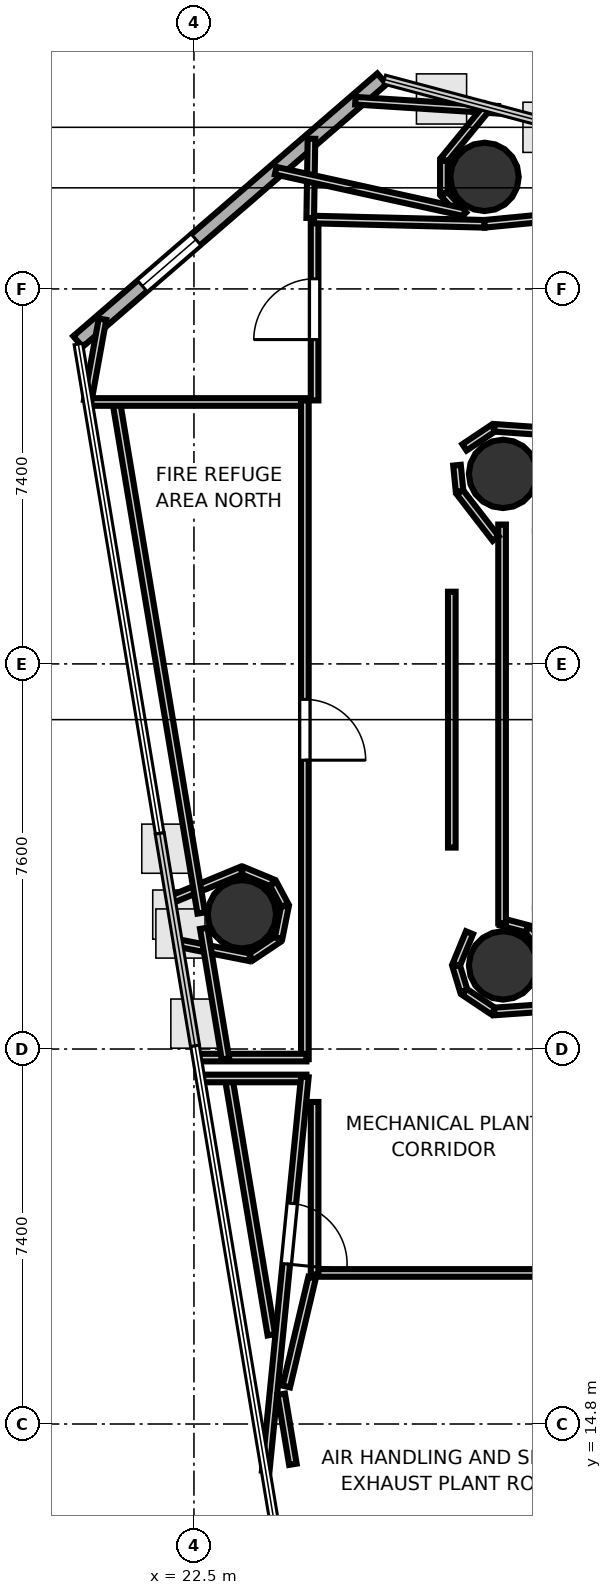
"""IFC4 building model, lengths in metres.
Left out: names, types, materials, properties, quantities, classifications, styles, units other than length and angle.
Written with IfcOpenShell. Run it as: python <this file> out.ifc"""

import sys

from ifc_helpers import new_model, si_unit, direction, frame, frame_2d, origin, origin_2d, place, context, subcontext, project, spatial, rectangle, hollow_circle, extrude, element, fill, save


model = new_model("IFC4")
c1 = context("Model", 3, precision=1e-05, world=origin(), true_north=direction((0.0, 1.0)))
c2 = subcontext(c1, "Body", "Model", "MODEL_VIEW")
j1 = project(units=[si_unit("LENGTHUNIT", "METRE"), si_unit("PLANEANGLEUNIT", "RADIAN")], contexts=[c1])
p1 = place(None, origin())
s1 = spatial("IfcSite", under=j1, at=p1, CompositionType="ELEMENT")
p2 = place(p1, origin())
s2 = spatial("IfcBuilding", under=s1, at=p2, CompositionType="ELEMENT")
p3 = place(p2, frame((0.0, 0.0, 184.6)))
s3 = spatial("IfcBuildingStorey", under=s2, at=p3, CompositionType="ELEMENT", Elevation=184.6)
for number, where, z_axis, x_axis in (
    (1, (28.6, 33.55, 0.0), (0.0, 0.0, 1.0), (1.0, 0.0, 0.0)),
    (2, (28.6, 23.85, 0.0), (0.0, 0.0, 1.0), (1.0, 0.0, 0.0)),
    (3, (28.235, 39.411, 0.0), (0.0, 0.0, 1.0), (1.0, 0.0, 0.0)),
    (4, (23.446, 24.859, 0.0), (0.0, 0.0, 1.0), (1.0, 0.0, 0.0)),
):
    element("IfcColumn", number, at=place(p3, frame(where, z_axis=z_axis, x_axis=x_axis)), inside=s3, PredefinedType="COLUMN", context=c2, shape_type="SweptSolid", body=[
        extrude(hollow_circle(Radius=0.675, WallThickness=0.032, at=origin_2d()), origin(), (0.0, 0.0, 1.0), 4.6),
    ])
p4 = place(p3, frame((26.21, 41.345, 0.0), z_axis=(0.0, 0.0, 1.0), x_axis=(-0.756696991228, -0.653765755808, 0.0)))
e5 = element("IfcWall", 5, at=p4, inside=s3, PredefinedType="SOLIDWALL", context=c2, shape_type="SweptSolid", body=[
    extrude(rectangle(XDim=7.929, YDim=0.28, at=frame_2d((3.965, 0.0))), origin(), (0.0, 0.0, 1.0), 4.42),
])
p5 = place(p4, frame((4.85, 0.0, 1.0)))
e6 = element("IfcOpeningElement", 6, at=p5, cuts=e5, PredefinedType="OPENING", context=c2, shape_type="SweptSolid", body=[
    extrude(rectangle(XDim=1.4, YDim=1.5, at=frame_2d((0.7, 0.75))), frame((0.0, 0.15, 0.0), z_axis=(0.0, -1.0, 0.0), x_axis=(1.0, 0.0, 0.0)), (0.0, 0.0, 1.0), 0.3),
])
p6 = place(p3, frame((29.402, 24.169, 0.0), z_axis=(0.0, 0.0, 1.0), x_axis=(-0.622091855036, 0.782944266151, 0.0)))
e7 = element("IfcWall", 7, at=p6, inside=s3, PredefinedType="PARTITIONING", context=c2, shape_type="SweptSolid", body=[
    extrude(rectangle(XDim=0.504, YDim=0.15, at=frame_2d((0.252, 0.0))), origin(), (0.0, 0.0, 1.0), 2.94),
])
p7 = place(p3, frame((29.072, 24.574, 0.0), z_axis=(0.0, 0.0, 1.0), x_axis=(-0.966842101769, 0.255374920942, 0.0)))
e8 = element("IfcWall", 8, at=p7, inside=s3, PredefinedType="PARTITIONING", context=c2, shape_type="SweptSolid", body=[
    extrude(rectangle(XDim=0.531, YDim=0.15, at=frame_2d((0.266, 0.0))), origin(), (0.0, 0.0, 1.0), 2.94),
])
p8 = place(p3, frame((28.581, 24.68, 0.0), z_axis=(0.0, 0.0, 1.0), x_axis=(0.0, 1.0, 0.0)))
e9 = element("IfcWall", 9, at=p8, inside=s3, PredefinedType="PARTITIONING", context=c2, shape_type="SweptSolid", body=[
    extrude(rectangle(XDim=7.87, YDim=0.15, at=frame_2d((3.935, 0.0))), origin(), (0.0, 0.0, 1.0), 2.94),
])
p9 = place(p3, frame((22.164, 24.296, 0.0), z_axis=(0.0, 0.0, 1.0), x_axis=(0.98076583737, -0.195188043304, 0.0)))
e10 = element("IfcWall", 10, at=p9, inside=s3, PredefinedType="PARTITIONING", context=c2, shape_type="SweptSolid", body=[
    extrude(rectangle(XDim=1.467, YDim=0.15, at=frame_2d((0.734, 0.0))), origin(), (0.0, 0.0, 1.0), 2.94),
])
for number, where, z_axis, x_axis in (
    (11, (23.626, 24.014, 0.0), (0.0, 0.0, 1.0), (0.831, 0.556, 0.0)),
    (12, (24.171, 24.389, 0.0), (0.0, 0.0, 1.0), (0.195, 0.981, 0.0)),
):
    element("IfcWall", number, at=place(p3, frame(where, z_axis=z_axis, x_axis=x_axis)), inside=s3, PredefinedType="PARTITIONING", context=c2, shape_type="SweptSolid", body=[
        extrude(rectangle(XDim=0.639, YDim=0.15, at=frame_2d((0.319, 0.0))), origin(), (0.0, 0.0, 1.0), 2.94),
    ])
p10 = place(p3, frame((24.292, 25.037, 0.0), z_axis=(0.0, 0.0, 1.0), x_axis=(-0.471424550379, 0.88190639713, 0.0)))
e13 = element("IfcWall", 13, at=p10, inside=s3, PredefinedType="PARTITIONING", context=c2, shape_type="SweptSolid", body=[
    extrude(rectangle(XDim=0.485, YDim=0.15, at=frame_2d((0.242, 0.0))), origin(), (0.0, 0.0, 1.0), 2.94),
])
p11 = place(p3, frame((24.048, 25.478, 0.0), z_axis=(0.0, 0.0, 1.0), x_axis=(-0.923821221018, 0.382824178437, 0.0)))
e14 = element("IfcWall", 14, at=p11, inside=s3, PredefinedType="PARTITIONING", context=c2, shape_type="SweptSolid", body=[
    extrude(rectangle(XDim=0.639, YDim=0.15, at=frame_2d((0.319, 0.0))), origin(), (0.0, 0.0, 1.0), 2.94),
])
p12 = place(p3, frame((23.434, 25.723, 0.0), z_axis=(0.0, 0.0, 1.0), x_axis=(-0.923888257307, -0.382662368165, 0.0)))
e15 = element("IfcWall", 15, at=p12, inside=s3, PredefinedType="PARTITIONING", context=c2, shape_type="SweptSolid", body=[
    extrude(rectangle(XDim=1.527, YDim=0.15, at=frame_2d((0.764, 0.0))), origin(), (0.0, 0.0, 1.0), 2.94),
])
p13 = place(p3, frame((22.644, 24.884, 0.0), z_axis=(0.0, 0.0, 1.0), x_axis=(-0.164020823303, 0.986456876667, 0.0)))
e16 = element("IfcWall", 16, at=p13, inside=s3, PredefinedType="PARTITIONING", context=c2, shape_type="SweptSolid", body=[
    extrude(rectangle(XDim=10.26, YDim=0.15, at=frame_2d((5.13, 0.0))), origin(), (0.0, 0.0, 1.0), 2.94),
])
p14 = place(p3, frame((20.388, 34.969, 0.0), z_axis=(0.0, 0.0, 1.0), x_axis=(1.0, 0.0, 0.0)))
e17 = element("IfcWall", 17, at=p14, inside=s3, PredefinedType="PARTITIONING", context=c2, shape_type="SweptSolid", body=[
    extrude(rectangle(XDim=4.332, YDim=0.15, at=frame_2d((2.166, 0.0))), origin(), (0.0, 0.0, 1.0), 2.94),
])
p15 = place(p3, frame((24.689, 35.0, 0.0), z_axis=(0.0, 0.0, 1.0), x_axis=(0.0, -1.0, 0.0)))
e18 = element("IfcWall", 18, at=p15, inside=s3, PredefinedType="PARTITIONING", context=c2, shape_type="SweptSolid", body=[
    extrude(rectangle(XDim=13.0, YDim=0.15, at=frame_2d((6.5, 0.0))), origin(), (0.0, 0.0, 1.0), 2.94),
])
p16 = place(p15, frame((5.9, 0.0, 0.0)))
e19 = element("IfcOpeningElement", 19, at=p16, cuts=e18, PredefinedType="OPENING", context=c2, shape_type="SweptSolid", body=[
    extrude(rectangle(XDim=1.2, YDim=2.15, at=frame_2d((0.6, 1.075))), frame((0.0, 0.085, 0.0), z_axis=(0.0, -1.0, 0.0), x_axis=(1.0, 0.0, 0.0)), (0.0, 0.0, 1.0), 0.17),
])
p17 = place(p3, frame((24.72, 22.031, 0.0), z_axis=(0.0, 0.0, 1.0), x_axis=(-1.0, 0.0, 0.0)))
e20 = element("IfcWall", 20, at=p17, inside=s3, PredefinedType="PARTITIONING", context=c2, shape_type="SweptSolid", body=[
    extrude(rectangle(XDim=2.181, YDim=0.15, at=frame_2d((1.09, 0.0))), origin(), (0.0, 0.0, 1.0), 2.94),
])
p18 = place(p3, frame((23.122, 22.005, 0.0), z_axis=(0.0, 0.0, 1.0), x_axis=(-0.164020088394, 0.986456998862, 0.0)))
e21 = element("IfcWall", 21, at=p18, inside=s3, PredefinedType="PARTITIONING", context=c2, shape_type="SweptSolid", body=[
    extrude(rectangle(XDim=2.612, YDim=0.15, at=frame_2d((1.306, 0.0))), origin(), (0.0, 0.0, 1.0), 2.94),
])
p19 = place(p3, frame((24.028, 16.56, 0.0), z_axis=(0.0, 0.0, 1.0), x_axis=(-0.16403102715, 0.986455179991, 0.0)))
e22 = element("IfcWall", 22, at=p19, inside=s3, PredefinedType="PARTITIONING", context=c2, shape_type="SweptSolid", body=[
    extrude(rectangle(XDim=5.165, YDim=0.15, at=frame_2d((2.583, 0.0))), origin(), (0.0, 0.0, 1.0), 2.94),
])
p20 = place(p3, frame((22.608, 21.619, 0.0), z_axis=(0.0, 0.0, 1.0), x_axis=(1.0, 0.0, 0.0)))
e23 = element("IfcWall", 23, at=p20, inside=s3, PredefinedType="PARTITIONING", context=c2, shape_type="SweptSolid", body=[
    extrude(rectangle(XDim=2.112, YDim=0.15, at=frame_2d((1.056, 0.0))), origin(), (0.0, 0.0, 1.0), 2.94),
])
p21 = place(p3, frame((24.689, 21.65, 0.0), z_axis=(0.0, 0.0, 1.0), x_axis=(-0.098885214939, -0.99509884648, 0.0)))
e24 = element("IfcWall", 24, at=p21, inside=s3, PredefinedType="PARTITIONING", context=c2, shape_type="SweptSolid", body=[
    extrude(rectangle(XDim=7.817, YDim=0.15, at=frame_2d((3.908, 0.0))), origin(), (0.0, 0.0, 1.0), 2.94),
])
p22 = place(p21, frame((2.509, 0.0, 0.0)))
e25 = element("IfcOpeningElement", 25, at=p22, cuts=e24, PredefinedType="OPENING", context=c2, shape_type="SweptSolid", body=[
    extrude(rectangle(XDim=1.2, YDim=2.15, at=frame_2d((0.6, 1.075))), frame((0.0, 0.085, 0.0), z_axis=(0.0, -1.0, 0.0), x_axis=(1.0, 0.0, 0.0)), (0.0, 0.0, 1.0), 0.17),
])
p23 = place(p3, frame((27.938, 24.495, 0.0), z_axis=(0.0, 0.0, 1.0), x_axis=(-0.382488222826, -0.92396036679, 0.0)))
e26 = element("IfcWall", 26, at=p23, inside=s3, PredefinedType="PARTITIONING", context=c2, shape_type="SweptSolid", body=[
    extrude(rectangle(XDim=0.685, YDim=0.15, at=frame_2d((0.342, 0.0))), origin(), (0.0, 0.0, 1.0), 2.94),
])
p24 = place(p3, frame((27.675, 23.841, 0.0), z_axis=(0.0, 0.0, 1.0), x_axis=(0.290320299012, -0.956929529266, 0.0)))
e27 = element("IfcWall", 27, at=p24, inside=s3, PredefinedType="PARTITIONING", context=c2, shape_type="SweptSolid", body=[
    extrude(rectangle(XDim=0.52, YDim=0.15, at=frame_2d((0.26, 0.0))), origin(), (0.0, 0.0, 1.0), 2.94),
])
p25 = place(p3, frame((27.839, 23.327, 0.0), z_axis=(0.0, 0.0, 1.0), x_axis=(0.831446689096, -0.555604538491, 0.0)))
e28 = element("IfcWall", 28, at=p25, inside=s3, PredefinedType="PARTITIONING", context=c2, shape_type="SweptSolid", body=[
    extrude(rectangle(XDim=0.685, YDim=0.15, at=frame_2d((0.343, 0.0))), origin(), (0.0, 0.0, 1.0), 2.94),
])
p26 = place(p3, frame((28.427, 22.941, 0.0), z_axis=(0.0, 0.0, 1.0), x_axis=(0.997554628318, 0.069891083281, 0.0)))
e29 = element("IfcWall", 29, at=p26, inside=s3, PredefinedType="PARTITIONING", context=c2, shape_type="SweptSolid", body=[
    extrude(rectangle(XDim=1.216, YDim=0.15, at=frame_2d((0.608, 0.0))), origin(), (0.0, 0.0, 1.0), 2.94),
])
p27 = place(p3, frame((30.05, 17.781, 0.0), z_axis=(0.0, 0.0, 1.0), x_axis=(-1.0, 0.0, 0.0)))
e30 = element("IfcWall", 30, at=p27, inside=s3, PredefinedType="PARTITIONING", context=c2, shape_type="SweptSolid", body=[
    extrude(rectangle(XDim=5.2, YDim=0.15, at=frame_2d((2.6, 0.0))), origin(), (0.0, 0.0, 1.0), 2.94),
])
p28 = place(p3, frame((24.881, 17.75, 0.0), z_axis=(0.0, 0.0, 1.0), x_axis=(0.0, 1.0, 0.0)))
e31 = element("IfcWall", 31, at=p28, inside=s3, PredefinedType="PARTITIONING", context=c2, shape_type="SweptSolid", body=[
    extrude(rectangle(XDim=3.405, YDim=0.15, at=frame_2d((1.703, 0.0))), origin(), (0.0, 0.0, 1.0), 2.94),
])
p29 = place(p3, frame((24.881, 35.0, 0.0), z_axis=(0.0, 0.0, 1.0), x_axis=(0.0, 1.0, 0.0)))
e32 = element("IfcWall", 32, at=p29, inside=s3, PredefinedType="PARTITIONING", context=c2, shape_type="SweptSolid", body=[
    extrude(rectangle(XDim=3.6, YDim=0.15, at=frame_2d((1.8, 0.0))), origin(), (0.0, 0.0, 1.0), 2.94),
])
p30 = place(p29, frame((1.2, 0.0, 0.0)))
e33 = element("IfcOpeningElement", 33, at=p30, cuts=e32, PredefinedType="OPENING", context=c2, shape_type="SweptSolid", body=[
    extrude(rectangle(XDim=1.2, YDim=2.15, at=frame_2d((0.6, 1.075))), frame((0.0, 0.085, 0.0), z_axis=(0.0, -1.0, 0.0), x_axis=(1.0, 0.0, 0.0)), (0.0, 0.0, 1.0), 0.17),
])
p31 = place(p3, frame((24.849, 38.569, 0.0), z_axis=(0.0, 0.0, 1.0), x_axis=(0.999692357243, -0.024803041536, 0.0)))
e34 = element("IfcWall", 34, at=p31, inside=s3, PredefinedType="PARTITIONING", context=c2, shape_type="SweptSolid", body=[
    extrude(rectangle(XDim=3.386, YDim=0.15, at=frame_2d((1.693, 0.0))), origin(), (0.0, 0.0, 1.0), 2.94),
])
p32 = place(p3, frame((28.235, 38.485, 0.0), z_axis=(0.0, 0.0, 1.0), x_axis=(0.99541493838, 0.095650930208, 0.0)))
e35 = element("IfcWall", 35, at=p32, inside=s3, PredefinedType="PARTITIONING", context=c2, shape_type="SweptSolid", body=[
    extrude(rectangle(XDim=6.432, YDim=0.15, at=frame_2d((3.216, 0.0))), origin(), (0.0, 0.0, 1.0), 2.94),
])
p33 = place(p3, frame((29.64, 34.374, 0.0), z_axis=(0.0, 0.0, 1.0), x_axis=(-0.997554628318, 0.069891083281, 0.0)))
e36 = element("IfcWall", 36, at=p33, inside=s3, PredefinedType="PARTITIONING", context=c2, shape_type="SweptSolid", body=[
    extrude(rectangle(XDim=1.216, YDim=0.15, at=frame_2d((0.608, 0.0))), origin(), (0.0, 0.0, 1.0), 2.94),
])
p34 = place(p3, frame((28.408, 34.454, 0.0), z_axis=(0.0, 0.0, 1.0), x_axis=(-0.831446689096, -0.555604538491, 0.0)))
e37 = element("IfcWall", 37, at=p34, inside=s3, PredefinedType="PARTITIONING", context=c2, shape_type="SweptSolid", body=[
    extrude(rectangle(XDim=0.685, YDim=0.15, at=frame_2d((0.343, 0.0))), origin(), (0.0, 0.0, 1.0), 2.94),
])
p35 = place(p3, frame((27.691, 33.722, 0.0), z_axis=(0.0, 0.0, 1.0), x_axis=(0.097735684959, -0.995212407421, 0.0)))
e38 = element("IfcWall", 38, at=p35, inside=s3, PredefinedType="PARTITIONING", context=c2, shape_type="SweptSolid", body=[
    extrude(rectangle(XDim=0.52, YDim=0.15, at=frame_2d((0.26, 0.0))), origin(), (0.0, 0.0, 1.0), 2.94),
])
p36 = place(p3, frame((27.749, 33.189, 0.0), z_axis=(0.0, 0.0, 1.0), x_axis=(0.611219218046, -0.791461349335, 0.0)))
e39 = element("IfcWall", 39, at=p36, inside=s3, PredefinedType="PARTITIONING", context=c2, shape_type="SweptSolid", body=[
    extrude(rectangle(XDim=1.157, YDim=0.15, at=frame_2d((0.578, 0.0))), origin(), (0.0, 0.0, 1.0), 2.94),
])
p37 = place(p3, frame((27.589, 31.225, 0.0), z_axis=(0.0, 0.0, 1.0), x_axis=(0.0, -1.0, 0.0)))
e40 = element("IfcWall", 40, at=p37, inside=s3, PredefinedType="PARTITIONING", context=c2, shape_type="SweptSolid", body=[
    extrude(rectangle(XDim=5.049, YDim=0.15, at=frame_2d((2.524, 0.0))), origin(), (0.0, 0.0, 1.0), 2.94),
])
p38 = place(p3, frame((24.819, 40.163, 0.0), z_axis=(0.0, 0.0, 1.0), x_axis=(-0.0156182135, -0.999878028265, 0.0)))
e41 = element("IfcWall", 41, at=p38, inside=s3, PredefinedType="PARTITIONING", context=c2, shape_type="SweptSolid", body=[
    extrude(rectangle(XDim=1.563, YDim=0.15, at=frame_2d((0.782, 0.0))), origin(), (0.0, 0.0, 1.0), 2.94),
])
p39 = place(p3, frame((20.404, 34.993, 0.0), z_axis=(0.0, 0.0, 1.0), x_axis=(0.177939529318, 0.984041423877, 0.0)))
e42 = element("IfcWall", 42, at=p39, inside=s3, PredefinedType="PARTITIONING", context=c2, shape_type="SweptSolid", body=[
    extrude(rectangle(XDim=1.635, YDim=0.15, at=frame_2d((0.818, 0.0))), origin(), (0.0, 0.0, 1.0), 2.94),
])
p40 = place(p3, frame((25.686, 40.914, 0.0), z_axis=(0.0, 0.0, 1.0), x_axis=(0.997990017517, -0.063371325817, 0.0)))
e43 = element("IfcWall", 43, at=p40, inside=s3, PredefinedType="PARTITIONING", context=c2, shape_type="SweptSolid", body=[
    extrude(rectangle(XDim=2.816, YDim=0.15, at=frame_2d((1.408, 0.0))), origin(), (0.0, 0.0, 1.0), 2.94),
])
p41 = place(p3, frame((28.306, 40.806, 0.0), z_axis=(0.0, 0.0, 1.0), x_axis=(-0.634308390402, -0.773080116072, 0.0)))
e44 = element("IfcWall", 44, at=p41, inside=s3, PredefinedType="PARTITIONING", context=c2, shape_type="SweptSolid", body=[
    extrude(rectangle(XDim=1.365, YDim=0.15, at=frame_2d((0.683, 0.0))), origin(), (0.0, 0.0, 1.0), 2.94),
])
p42 = place(p3, frame((27.433, 39.73, 0.0), z_axis=(0.0, 0.0, 1.0), x_axis=(0.0, -1.0, 0.0)))
e45 = element("IfcWall", 45, at=p42, inside=s3, PredefinedType="PARTITIONING", context=c2, shape_type="SweptSolid", body=[
    extrude(rectangle(XDim=0.639, YDim=0.15, at=frame_2d((0.319, 0.0))), origin(), (0.0, 0.0, 1.0), 2.94),
])
p43 = place(p3, frame((27.441, 39.071, 0.0), z_axis=(0.0, 0.0, 1.0), x_axis=(0.674871425399, -0.737935335365, 0.0)))
e46 = element("IfcWall", 46, at=p43, inside=s3, PredefinedType="PARTITIONING", context=c2, shape_type="SweptSolid", body=[
    extrude(rectangle(XDim=0.557, YDim=0.15, at=frame_2d((0.279, 0.0))), origin(), (0.0, 0.0, 1.0), 2.94),
])
p44 = place(p3, frame((27.84, 38.711, 0.0), z_axis=(0.0, 0.0, 1.0), x_axis=(-0.976497643717, 0.21552807663, 0.0)))
e47 = element("IfcWall", 47, at=p44, inside=s3, PredefinedType="PARTITIONING", context=c2, shape_type="SweptSolid", body=[
    extrude(rectangle(XDim=3.816, YDim=0.15, at=frame_2d((1.908, 0.0))), origin(), (0.0, 0.0, 1.0), 2.94),
])
p45 = place(p3, frame((24.323, 15.54, 0.0), z_axis=(0.0, 0.0, 1.0), x_axis=(0.23022929388, 0.973136409883, 0.0)))
e48 = element("IfcWall", 48, at=p45, inside=s3, PredefinedType="PARTITIONING", context=c2, shape_type="SweptSolid", body=[
    extrude(rectangle(XDim=2.207, YDim=0.15, at=frame_2d((1.104, 0.0))), origin(), (0.0, 0.0, 1.0), 2.94),
])
p46 = place(p3, frame((24.452, 14.005, 0.0), z_axis=(0.0, 0.0, 1.0), x_axis=(-0.164088259429, 0.986445661513, 0.0)))
e49 = element("IfcWall", 49, at=p46, inside=s3, PredefinedType="PARTITIONING", context=c2, shape_type="SweptSolid", body=[
    extrude(rectangle(XDim=1.402, YDim=0.15, at=frame_2d((0.701, 0.0))), origin(), (0.0, 0.0, 1.0), 2.94),
])
p47 = place(p16, origin())
e50 = element("IfcDoor", 50, at=p47, inside=s3, OperationType="SINGLE_SWING_RIGHT", PredefinedType="DOOR", context=c2, shape_type="SweptSolid", body=[
    extrude(rectangle(XDim=1.2, YDim=2.15, at=frame_2d((0.6, 1.075))), frame((0.0, 0.025, 0.0), z_axis=(0.0, -1.0, 0.0), x_axis=(1.0, 0.0, 0.0)), (0.0, 0.0, 1.0), 0.05),
])
fill(e19, e50)
p48 = place(p30, origin())
e51 = element("IfcDoor", 51, at=p48, inside=s3, OperationType="SINGLE_SWING_LEFT", PredefinedType="DOOR", context=c2, shape_type="SweptSolid", body=[
    extrude(rectangle(XDim=1.2, YDim=2.15, at=frame_2d((0.6, 1.075))), frame((0.0, 0.025, 0.0), z_axis=(0.0, -1.0, 0.0), x_axis=(1.0, 0.0, 0.0)), (0.0, 0.0, 1.0), 0.05),
])
fill(e33, e51)
p49 = place(p22, origin())
e52 = element("IfcDoor", 52, at=p49, inside=s3, OperationType="SINGLE_SWING_RIGHT", PredefinedType="DOOR", context=c2, shape_type="SweptSolid", body=[
    extrude(rectangle(XDim=1.2, YDim=2.15, at=frame_2d((0.6, 1.075))), frame((0.0, 0.025, 0.0), z_axis=(0.0, -1.0, 0.0), x_axis=(1.0, 0.0, 0.0)), (0.0, 0.0, 1.0), 0.05),
])
fill(e25, e52)
p50 = place(p5, origin())
e53 = element("IfcWindow", 53, at=p50, inside=s3, PartitioningType="SINGLE_PANEL", PredefinedType="WINDOW", context=c2, shape_type="SweptSolid", body=[
    extrude(rectangle(XDim=1.4, YDim=1.5, at=frame_2d((0.7, 0.75))), frame((0.0, 0.03, 0.0), z_axis=(0.0, -1.0, 0.0), x_axis=(1.0, 0.0, 0.0)), (0.0, 0.0, 1.0), 0.06),
])
fill(e6, e53)
save(model, sys.argv[1])
